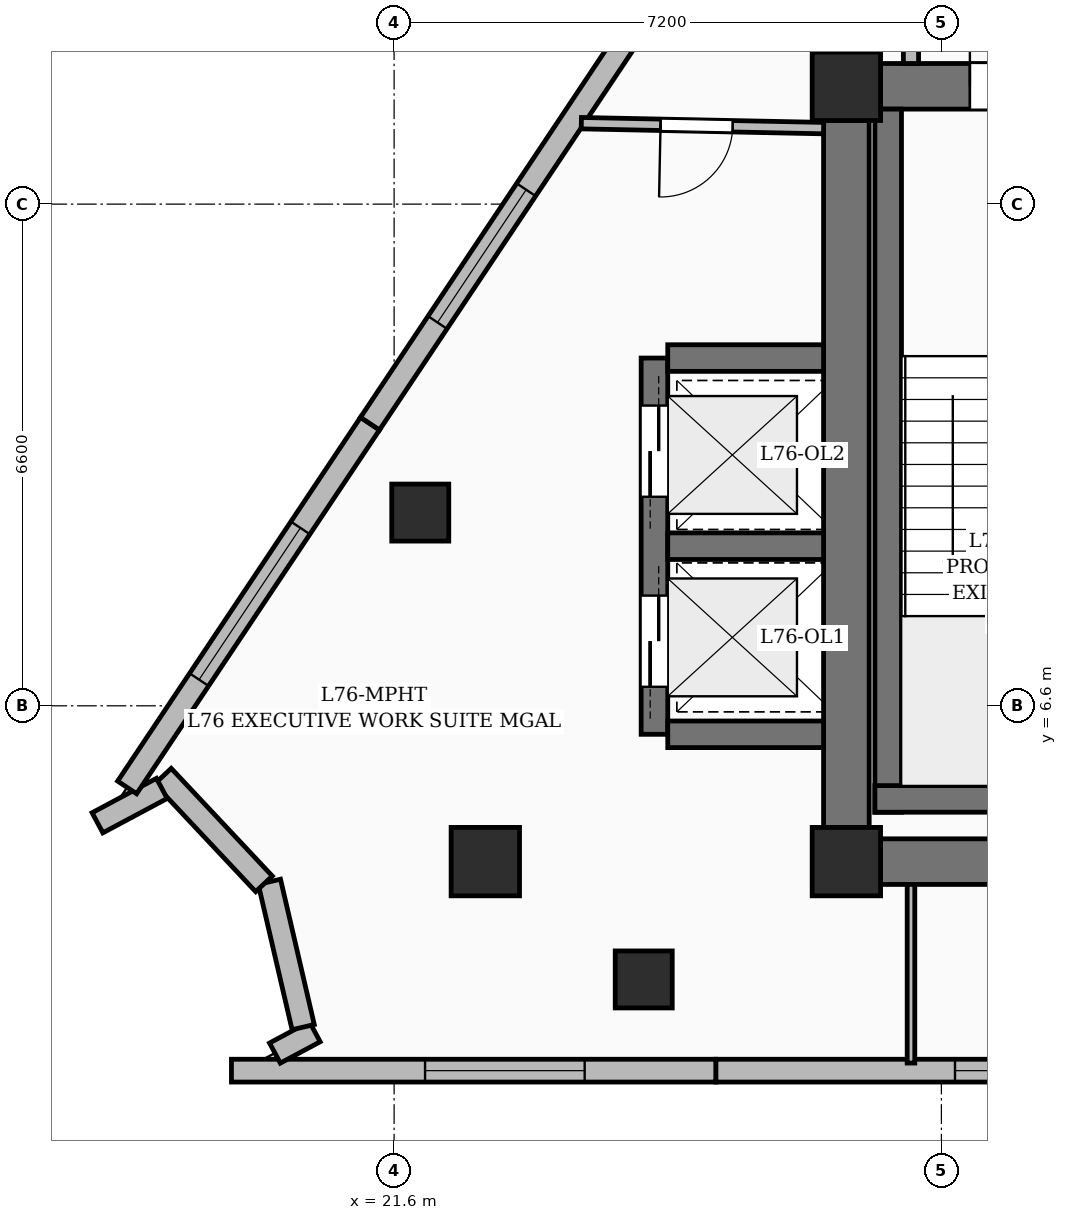
"""IFC4 building model, lengths in metres.
Left out: names, types, materials, properties, quantities, classifications, styles, units other than length and angle.
Written with IfcOpenShell. Run it as: python <this file> out.ifc"""

import sys

from ifc_helpers import new_model, si_unit, direction, frame, frame_2d, origin, origin_2d, place, context, subcontext, project, spatial, rectangle, extrude, element, fill, save


model = new_model("IFC4")
c1 = context("Model", 3, precision=1e-05, world=origin(), true_north=direction((0.0, 1.0)))
c2 = subcontext(c1, "Body", "Model", "MODEL_VIEW")
j1 = project(units=[si_unit("LENGTHUNIT", "METRE"), si_unit("PLANEANGLEUNIT", "RADIAN")], contexts=[c1])
p1 = place(None, origin())
s1 = spatial("IfcSite", under=j1, at=p1, CompositionType="ELEMENT")
p2 = place(p1, origin())
s2 = spatial("IfcBuilding", under=s1, at=p2, CompositionType="ELEMENT")
p3 = place(p2, frame((0.0, 0.0, 294.0)))
s3 = spatial("IfcBuildingStorey", under=s2, at=p3, CompositionType="ELEMENT", Elevation=294.0)
for number, where, z_axis, x_axis in (
    (1, (27.55, 4.55, 0.0), (0.0, 0.0, 1.0), (1.0, 0.0, 0.0)),
    (2, (27.55, 14.75, 0.0), (0.0, 0.0, 1.0), (1.0, 0.0, 0.0)),
    (3, (22.8, 4.55, 0.0), (0.0, 0.0, 1.0), (1.0, 0.0, 0.0)),
):
    element("IfcColumn", number, at=place(p3, frame(where, z_axis=z_axis, x_axis=x_axis)), inside=s3, PredefinedType="COLUMN", context=c2, shape_type="SweptSolid", body=[
        extrude(rectangle(XDim=0.9, YDim=0.9, at=origin_2d()), origin(), (0.0, 0.0, 1.0), 4.5),
    ])
p4 = place(p3, frame((28.0, 4.55, 0.0), z_axis=(0.0, 0.0, 1.0), x_axis=(1.0, 0.0, 0.0)))
e4 = element("IfcWall", 4, at=p4, inside=s3, PredefinedType="SHEAR", context=c2, shape_type="SweptSolid", body=[
    extrude(rectangle(XDim=6.7, YDim=0.6, at=frame_2d((3.35, 0.0))), origin(), (0.0, 0.0, 1.0), 4.5),
])
p5 = place(p3, frame((28.0, 14.75, 0.0), z_axis=(0.0, 0.0, 1.0), x_axis=(1.0, 0.0, 0.0)))
e5 = element("IfcWall", 5, at=p5, inside=s3, PredefinedType="SHEAR", context=c2, shape_type="SweptSolid", body=[
    extrude(rectangle(XDim=6.7, YDim=0.6, at=frame_2d((3.35, 0.0))), origin(), (0.0, 0.0, 1.0), 4.5),
])
p6 = place(p5, frame((1.175, 0.0, 0.0)))
e6 = element("IfcOpeningElement", 6, at=p6, cuts=e5, PredefinedType="OPENING", context=c2, shape_type="SweptSolid", body=[
    extrude(rectangle(XDim=1.05, YDim=2.15, at=frame_2d((0.525, 1.075))), frame((0.0, 0.31, 0.0), z_axis=(0.0, -1.0, 0.0), x_axis=(1.0, 0.0, 0.0)), (0.0, 0.0, 1.0), 0.62),
])
p7 = place(p5, frame((5.61, 0.0, 0.0)))
e7 = element("IfcOpeningElement", 7, at=p7, cuts=e5, PredefinedType="OPENING", context=c2, shape_type="SweptSolid", body=[
    extrude(rectangle(XDim=0.95, YDim=2.15, at=frame_2d((0.475, 1.075))), frame((0.0, 0.31, 0.0), z_axis=(0.0, -1.0, 0.0), x_axis=(1.0, 0.0, 0.0)), (0.0, 0.0, 1.0), 0.62),
])
p8 = place(p3, frame((27.55, 5.0, 0.0), z_axis=(0.0, 0.0, 1.0), x_axis=(0.0, 1.0, 0.0)))
e8 = element("IfcWall", 8, at=p8, inside=s3, PredefinedType="SHEAR", context=c2, shape_type="SweptSolid", body=[
    extrude(rectangle(XDim=9.3, YDim=0.6, at=frame_2d((4.65, 0.0))), origin(), (0.0, 0.0, 1.0), 4.5),
])
p9 = place(p3, frame((28.1, 5.2, 0.0), z_axis=(0.0, 0.0, 1.0), x_axis=(0.0, 1.0, 0.0)))
e9 = element("IfcWall", 9, at=p9, inside=s3, PredefinedType="SOLIDWALL", context=c2, shape_type="SweptSolid", body=[
    extrude(rectangle(XDim=9.25, YDim=0.35, at=frame_2d((4.625, 0.0))), origin(), (0.0, 0.0, 1.0), 4.5),
])
p10 = place(p3, frame((27.925, 5.375, 0.0), z_axis=(0.0, 0.0, 1.0), x_axis=(1.0, 0.0, 0.0)))
e10 = element("IfcWall", 10, at=p10, inside=s3, PredefinedType="SOLIDWALL", context=c2, shape_type="SweptSolid", body=[
    extrude(rectangle(XDim=3.55, YDim=0.35, at=frame_2d((1.775, 0.0))), origin(), (0.0, 0.0, 1.0), 4.5),
])
p11 = place(p3, frame((25.025, 6.225, 0.0), z_axis=(0.0, 0.0, 1.0), x_axis=(0.0, 1.0, 0.0)))
e11 = element("IfcWall", 11, at=p11, inside=s3, PredefinedType="SOLIDWALL", context=c2, shape_type="SweptSolid", body=[
    extrude(rectangle(XDim=4.95, YDim=0.35, at=frame_2d((2.475, 0.0))), origin(), (0.0, 0.0, 1.0), 4.5),
])
p12 = place(p11, frame((0.625, 0.0, 0.0)))
e12 = element("IfcOpeningElement", 12, at=p12, cuts=e11, PredefinedType="OPENING", context=c2, shape_type="SweptSolid", body=[
    extrude(rectangle(XDim=1.2, YDim=2.2, at=frame_2d((0.6, 1.1))), frame((0.0, 0.185, 0.0), z_axis=(0.0, -1.0, 0.0), x_axis=(1.0, 0.0, 0.0)), (0.0, 0.0, 1.0), 0.37),
])
p13 = place(p11, frame((3.125, 0.0, 0.0)))
e13 = element("IfcOpeningElement", 13, at=p13, cuts=e11, PredefinedType="OPENING", context=c2, shape_type="SweptSolid", body=[
    extrude(rectangle(XDim=1.2, YDim=2.2, at=frame_2d((0.6, 1.1))), frame((0.0, 0.185, 0.0), z_axis=(0.0, -1.0, 0.0), x_axis=(1.0, 0.0, 0.0)), (0.0, 0.0, 1.0), 0.37),
])
for number, where, z_axis, x_axis in (
    (14, (25.2, 6.225, 0.0), (0.0, 0.0, 1.0), (1.0, 0.0, 0.0)),
    (15, (25.2, 8.7, 0.0), (0.0, 0.0, 1.0), (1.0, 0.0, 0.0)),
    (16, (25.2, 11.175, 0.0), (0.0, 0.0, 1.0), (1.0, 0.0, 0.0)),
):
    element("IfcWall", number, at=place(p3, frame(where, z_axis=z_axis, x_axis=x_axis)), inside=s3, PredefinedType="SOLIDWALL", context=c2, shape_type="SweptSolid", body=[
        extrude(rectangle(XDim=2.05, YDim=0.35, at=frame_2d((1.025, 0.0))), origin(), (0.0, 0.0, 1.0), 4.5),
    ])
for number, where, z_axis, x_axis in (
    (17, (24.884, 3.0, 0.0), (0.0, 0.0, 1.0), (1.0, 0.0, 0.0)),
    (18, (21.944, 9.142, 0.0), (0.0, 0.0, 1.0), (1.0, 0.0, 0.0)),
):
    element("IfcColumn", number, at=place(p3, frame(where, z_axis=z_axis, x_axis=x_axis)), inside=s3, PredefinedType="COLUMN", context=c2, shape_type="SweptSolid", body=[
        extrude(rectangle(XDim=0.75, YDim=0.75, at=origin_2d()), origin(), (0.0, 0.0, 1.0), 4.5),
    ])
p14 = place(p3, frame((31.924, 1.8, 0.0), z_axis=(0.0, 0.0, 1.0), x_axis=(-1.0, 0.0, 0.0)))
e19 = element("IfcWall", 19, at=p14, inside=s3, PredefinedType="SOLIDWALL", context=c2, shape_type="SweptSolid", body=[
    extrude(rectangle(XDim=6.092, YDim=0.3, at=frame_2d((3.046, 0.0))), origin(), (0.0, 0.0, 1.0), 4.2),
])
p15 = place(p14, frame((0.545, 0.0, 0.6)))
e20 = element("IfcOpeningElement", 20, at=p15, cuts=e19, PredefinedType="OPENING", context=c2, shape_type="SweptSolid", body=[
    extrude(rectangle(XDim=2.4, YDim=2.1, at=frame_2d((1.2, 1.05))), frame((0.0, 0.16, 0.0), z_axis=(0.0, -1.0, 0.0), x_axis=(1.0, 0.0, 0.0)), (0.0, 0.0, 1.0), 0.32),
])
p16 = place(p3, frame((25.832, 1.8, 0.0), z_axis=(0.0, 0.0, 1.0), x_axis=(-1.0, 0.0, 0.0)))
e21 = element("IfcWall", 21, at=p16, inside=s3, PredefinedType="SOLIDWALL", context=c2, shape_type="SweptSolid", body=[
    extrude(rectangle(XDim=6.372, YDim=0.3, at=frame_2d((3.186, 0.0))), origin(), (0.0, 0.0, 1.0), 4.2),
])
p17 = place(p16, frame((1.725, 0.0, 0.55)))
e22 = element("IfcOpeningElement", 22, at=p17, cuts=e21, PredefinedType="OPENING", context=c2, shape_type="SweptSolid", body=[
    extrude(rectangle(XDim=2.1, YDim=2.4, at=frame_2d((1.05, 1.2))), frame((0.0, 0.16, 0.0), z_axis=(0.0, -1.0, 0.0), x_axis=(1.0, 0.0, 0.0)), (0.0, 0.0, 1.0), 0.32),
])
p18 = place(p3, frame((20.032, 2.031, 0.0), z_axis=(0.0, 0.0, 1.0), x_axis=(0.881601971089, 0.471993606495, 0.0)))
e23 = element("IfcWall", 23, at=p18, inside=s3, PredefinedType="SOLIDWALL", context=c2, shape_type="SweptSolid", body=[
    extrude(rectangle(XDim=0.595, YDim=0.3, at=frame_2d((0.297, 0.0))), origin(), (0.0, 0.0, 1.0), 4.2),
])
p19 = place(p3, frame((20.404, 2.373, 0.0), z_axis=(0.0, 0.0, 1.0), x_axis=(-0.226376282289, 0.974039926706, 0.0)))
e24 = element("IfcWall", 24, at=p19, inside=s3, PredefinedType="SOLIDWALL", context=c2, shape_type="SweptSolid", body=[
    extrude(rectangle(XDim=1.963, YDim=0.3, at=frame_2d((0.981, 0.0))), origin(), (0.0, 0.0, 1.0), 4.2),
])
p20 = place(p3, frame((19.888, 4.257, 0.0), z_axis=(0.0, 0.0, 1.0), x_axis=(-0.684454988333, 0.72905512065, 0.0)))
e25 = element("IfcWall", 25, at=p20, inside=s3, PredefinedType="SOLIDWALL", context=c2, shape_type="SweptSolid", body=[
    extrude(rectangle(XDim=1.943, YDim=0.3, at=frame_2d((0.972, 0.0))), origin(), (0.0, 0.0, 1.0), 4.2),
])
p21 = place(p3, frame((18.544, 5.513, 0.0), z_axis=(0.0, 0.0, 1.0), x_axis=(-0.881986380724, -0.471274892412, 0.0)))
e26 = element("IfcWall", 26, at=p21, inside=s3, PredefinedType="SOLIDWALL", context=c2, shape_type="SweptSolid", body=[
    extrude(rectangle(XDim=0.959, YDim=0.3, at=frame_2d((0.48, 0.0))), origin(), (0.0, 0.0, 1.0), 4.2),
])
p22 = place(p3, frame((18.088, 5.526, 0.0), z_axis=(0.0, 0.0, 1.0), x_axis=(0.555218981554, 0.831704203742, 0.0)))
e27 = element("IfcWall", 27, at=p22, inside=s3, PredefinedType="SOLIDWALL", context=c2, shape_type="SweptSolid", body=[
    extrude(rectangle(XDim=5.755, YDim=0.3, at=frame_2d((2.877, 0.0))), origin(), (0.0, 0.0, 1.0), 4.2),
])
p23 = place(p22, frame((1.705, 0.0, 0.6)))
e28 = element("IfcOpeningElement", 28, at=p23, cuts=e27, PredefinedType="OPENING", context=c2, shape_type="SweptSolid", body=[
    extrude(rectangle(XDim=2.4, YDim=2.1, at=frame_2d((1.2, 1.05))), frame((0.0, 0.16, 0.0), z_axis=(0.0, -1.0, 0.0), x_axis=(1.0, 0.0, 0.0)), (0.0, 0.0, 1.0), 0.32),
])
p24 = place(p3, frame((21.283, 10.312, 0.0), z_axis=(0.0, 0.0, 1.0), x_axis=(0.555265721759, 0.831672999586, 0.0)))
e29 = element("IfcWall", 29, at=p24, inside=s3, PredefinedType="SOLIDWALL", context=c2, shape_type="SweptSolid", body=[
    extrude(rectangle(XDim=6.375, YDim=0.3, at=frame_2d((3.187, 0.0))), origin(), (0.0, 0.0, 1.0), 4.2),
])
p25 = place(p24, frame((1.6, 0.0, 0.55)))
e30 = element("IfcOpeningElement", 30, at=p25, cuts=e29, PredefinedType="OPENING", context=c2, shape_type="SweptSolid", body=[
    extrude(rectangle(XDim=2.1, YDim=2.4, at=frame_2d((1.05, 1.2))), frame((0.0, 0.16, 0.0), z_axis=(0.0, -1.0, 0.0), x_axis=(1.0, 0.0, 0.0)), (0.0, 0.0, 1.0), 0.32),
])
p26 = place(p3, frame((28.4, 4.25, 0.0), z_axis=(0.0, 0.0, 1.0), x_axis=(0.0, -1.0, 0.0)))
e31 = element("IfcWall", 31, at=p26, inside=s3, PredefinedType="PARTITIONING", context=c2, shape_type="SweptSolid", body=[
    extrude(rectangle(XDim=2.35, YDim=0.1, at=frame_2d((1.175, 0.0))), origin(), (0.0, 0.0, 1.0), 3.477),
])
p27 = place(p3, frame((28.4, 17.265, 0.0), z_axis=(0.0, 0.0, 1.0), x_axis=(0.0, -1.0, 0.0)))
e32 = element("IfcWall", 32, at=p27, inside=s3, PredefinedType="PARTITIONING", context=c2, shape_type="SweptSolid", body=[
    extrude(rectangle(XDim=2.215, YDim=0.2, at=frame_2d((1.107, 0.0))), origin(), (0.0, 0.0, 1.0), 3.535),
])
p28 = place(p3, frame((27.25, 14.2, 0.0), z_axis=(0.0, 0.0, 1.0), x_axis=(-0.999792455685, 0.020372666862, 0.0)))
e33 = element("IfcWall", 33, at=p28, inside=s3, PredefinedType="PARTITIONING", context=c2, shape_type="SweptSolid", body=[
    extrude(rectangle(XDim=3.188, YDim=0.15, at=frame_2d((1.594, 0.0))), origin(), (0.0, 0.0, 1.0), 3.477),
])
p29 = place(p28, frame((1.195, 0.0, 0.0)))
e34 = element("IfcOpeningElement", 34, at=p29, cuts=e33, PredefinedType="OPENING", context=c2, shape_type="SweptSolid", body=[
    extrude(rectangle(XDim=0.95, YDim=2.2, at=frame_2d((0.475, 1.1))), frame((0.0, 0.085, 0.0), z_axis=(0.0, -1.0, 0.0), x_axis=(1.0, 0.0, 0.0)), (0.0, 0.0, 1.0), 0.17),
])
p30 = place(p15, origin())
e35 = element("IfcWindow", 35, at=p30, inside=s3, PartitioningType="SINGLE_PANEL", PredefinedType="WINDOW", context=c2, shape_type="SweptSolid", body=[
    extrude(rectangle(XDim=2.4, YDim=2.1, at=frame_2d((1.2, 1.05))), frame((0.0, 0.03, 0.0), z_axis=(0.0, -1.0, 0.0), x_axis=(1.0, 0.0, 0.0)), (0.0, 0.0, 1.0), 0.06),
])
fill(e20, e35)
p31 = place(p17, origin())
e36 = element("IfcWindow", 36, at=p31, inside=s3, PartitioningType="SINGLE_PANEL", PredefinedType="WINDOW", context=c2, shape_type="SweptSolid", body=[
    extrude(rectangle(XDim=2.1, YDim=2.4, at=frame_2d((1.05, 1.2))), frame((0.0, 0.03, 0.0), z_axis=(0.0, -1.0, 0.0), x_axis=(1.0, 0.0, 0.0)), (0.0, 0.0, 1.0), 0.06),
])
fill(e22, e36)
p32 = place(p23, origin())
e37 = element("IfcWindow", 37, at=p32, inside=s3, PartitioningType="SINGLE_PANEL", PredefinedType="WINDOW", context=c2, shape_type="SweptSolid", body=[
    extrude(rectangle(XDim=2.4, YDim=2.1, at=frame_2d((1.2, 1.05))), frame((0.0, 0.03, 0.0), z_axis=(0.0, -1.0, 0.0), x_axis=(1.0, 0.0, 0.0)), (0.0, 0.0, 1.0), 0.06),
])
fill(e28, e37)
p33 = place(p25, origin())
e38 = element("IfcWindow", 38, at=p33, inside=s3, PartitioningType="SINGLE_PANEL", PredefinedType="WINDOW", context=c2, shape_type="SweptSolid", body=[
    extrude(rectangle(XDim=2.1, YDim=2.4, at=frame_2d((1.05, 1.2))), frame((0.0, 0.03, 0.0), z_axis=(0.0, -1.0, 0.0), x_axis=(1.0, 0.0, 0.0)), (0.0, 0.0, 1.0), 0.06),
])
fill(e30, e38)
p34 = place(p6, origin())
e39 = element("IfcDoor", 39, at=p34, inside=s3, OperationType="SINGLE_SWING_LEFT", PredefinedType="DOOR", context=c2, shape_type="SweptSolid", body=[
    extrude(rectangle(XDim=1.05, YDim=2.15, at=frame_2d((0.525, 1.075))), frame((0.0, 0.025, 0.0), z_axis=(0.0, -1.0, 0.0), x_axis=(1.0, 0.0, 0.0)), (0.0, 0.0, 1.0), 0.05),
])
fill(e6, e39)
p35 = place(p12, origin())
e40 = element("IfcDoor", 40, at=p35, inside=s3, OperationType="DOUBLE_DOOR_SLIDING", PredefinedType="DOOR", context=c2, shape_type="SweptSolid", body=[
    extrude(rectangle(XDim=1.2, YDim=2.2, at=frame_2d((0.6, 1.1))), frame((0.0, 0.025, 0.0), z_axis=(0.0, -1.0, 0.0), x_axis=(1.0, 0.0, 0.0)), (0.0, 0.0, 1.0), 0.05),
])
fill(e12, e40)
p36 = place(p13, origin())
e41 = element("IfcDoor", 41, at=p36, inside=s3, OperationType="DOUBLE_DOOR_SLIDING", PredefinedType="DOOR", context=c2, shape_type="SweptSolid", body=[
    extrude(rectangle(XDim=1.2, YDim=2.2, at=frame_2d((0.6, 1.1))), frame((0.0, 0.025, 0.0), z_axis=(0.0, -1.0, 0.0), x_axis=(1.0, 0.0, 0.0)), (0.0, 0.0, 1.0), 0.05),
])
fill(e13, e41)
p37 = place(p29, origin())
e42 = element("IfcDoor", 42, at=p37, inside=s3, OperationType="SINGLE_SWING_RIGHT", PredefinedType="DOOR", context=c2, shape_type="SweptSolid", body=[
    extrude(rectangle(XDim=0.95, YDim=2.2, at=frame_2d((0.475, 1.1))), frame((0.0, 0.025, 0.0), z_axis=(0.0, -1.0, 0.0), x_axis=(1.0, 0.0, 0.0)), (0.0, 0.0, 1.0), 0.05),
])
fill(e34, e42)
save(model, sys.argv[1])
